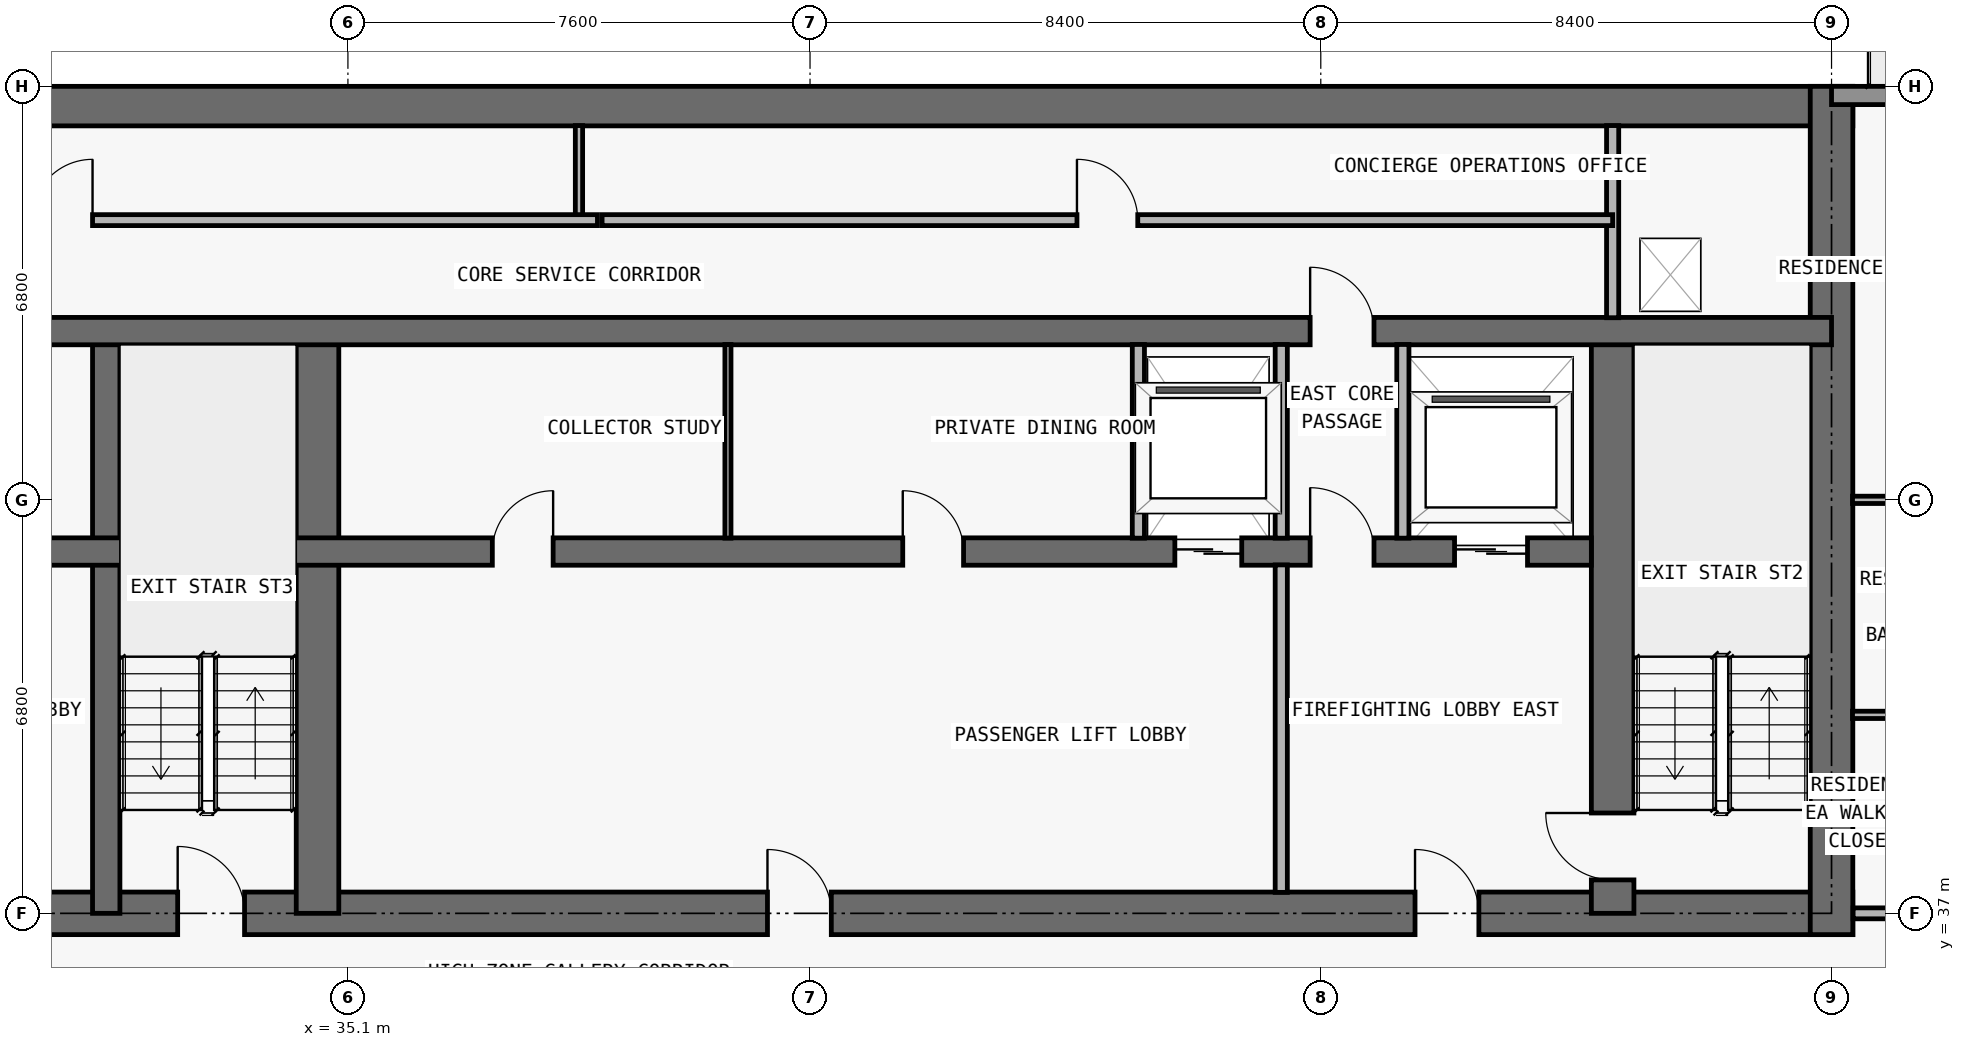
"""IFC4 building model, lengths in metres.
Left out: names, types, materials, properties, quantities, classifications, styles, units other than length and angle.
Written with IfcOpenShell. Run it as: python <this file> out.ifc"""

import sys

from ifc_helpers import new_model, si_unit, direction, frame, frame_2d, origin, place, context, subcontext, project, spatial, rectangle, extrude, element, fill, save


model = new_model("IFC4")
c1 = context("Model", 3, precision=1e-05, world=origin(), true_north=direction((0.0, 1.0)))
c2 = subcontext(c1, "Body", "Model", "MODEL_VIEW")
j1 = project(units=[si_unit("LENGTHUNIT", "METRE"), si_unit("PLANEANGLEUNIT", "RADIAN")], contexts=[c1])
p1 = place(None, origin())
s1 = spatial("IfcSite", under=j1, at=p1, CompositionType="ELEMENT")
p2 = place(p1, origin())
s2 = spatial("IfcBuilding", under=s1, at=p2, CompositionType="ELEMENT")
p3 = place(p2, frame((0.0, 0.0, 218.1)))
s3 = spatial("IfcBuildingStorey", under=s2, at=p3, CompositionType="ELEMENT", Elevation=218.1)
p4 = place(p3, frame((17.95, 37.0, 0.0), z_axis=(0.0, 0.0, 1.0), x_axis=(1.0, 0.0, 0.0)))
e1 = element("IfcWall", 1, at=p4, inside=s3, PredefinedType="SHEAR", context=c2, shape_type="SweptSolid", body=[
    extrude(rectangle(XDim=41.9, YDim=0.7, at=frame_2d((20.95, 0.0))), origin(), (0.0, 0.0, 1.0), 3.0),
])
p5 = place(p4, frame((14.35, 0.0, 0.0)))
e2 = element("IfcOpeningElement", 2, at=p5, cuts=e1, PredefinedType="OPENING", context=c2, shape_type="SweptSolid", body=[
    extrude(rectangle(XDim=1.1, YDim=2.15, at=frame_2d((0.55, 1.075))), frame((0.0, 0.36, 0.0), z_axis=(0.0, -1.0, 0.0), x_axis=(1.0, 0.0, 0.0)), (0.0, 0.0, 1.0), 0.72),
])
p6 = place(p4, frame((6.2, 0.0, 0.0)))
e3 = element("IfcOpeningElement", 3, at=p6, cuts=e1, PredefinedType="OPENING", context=c2, shape_type="SweptSolid", body=[
    extrude(rectangle(XDim=1.05, YDim=2.15, at=frame_2d((0.525, 1.075))), frame((0.0, 0.36, 0.0), z_axis=(0.0, -1.0, 0.0), x_axis=(1.0, 0.0, 0.0)), (0.0, 0.0, 1.0), 0.72),
])
p7 = place(p4, frame((34.7, 0.0, 0.0)))
e4 = element("IfcOpeningElement", 4, at=p7, cuts=e1, PredefinedType="OPENING", context=c2, shape_type="SweptSolid", body=[
    extrude(rectangle(XDim=1.05, YDim=2.15, at=frame_2d((0.525, 1.075))), frame((0.0, 0.36, 0.0), z_axis=(0.0, -1.0, 0.0), x_axis=(1.0, 0.0, 0.0)), (0.0, 0.0, 1.0), 0.72),
])
p8 = place(p4, frame((10.812, 0.0, 0.0)))
e5 = element("IfcOpeningElement", 5, at=p8, cuts=e1, PredefinedType="OPENING", context=c2, shape_type="SweptSolid", body=[
    extrude(rectangle(XDim=1.05, YDim=2.15, at=frame_2d((0.525, 1.075))), frame((0.0, 0.36, 0.0), z_axis=(0.0, -1.0, 0.0), x_axis=(1.0, 0.0, 0.0)), (0.0, 0.0, 1.0), 0.72),
])
p9 = place(p4, frame((24.05, 0.0, 0.0)))
e6 = element("IfcOpeningElement", 6, at=p9, cuts=e1, PredefinedType="OPENING", context=c2, shape_type="SweptSolid", body=[
    extrude(rectangle(XDim=1.05, YDim=2.15, at=frame_2d((0.525, 1.075))), frame((0.0, 0.36, 0.0), z_axis=(0.0, -1.0, 0.0), x_axis=(1.0, 0.0, 0.0)), (0.0, 0.0, 1.0), 0.72),
])
p10 = place(p3, frame((17.95, 50.275, 0.0), z_axis=(0.0, 0.0, 1.0), x_axis=(1.0, 0.0, 0.0)))
e7 = element("IfcWall", 7, at=p10, inside=s3, PredefinedType="SHEAR", context=c2, shape_type="SweptSolid", body=[
    extrude(rectangle(XDim=41.9, YDim=0.65, at=frame_2d((20.95, 0.0))), origin(), (0.0, 0.0, 1.0), 3.0),
])
p11 = place(p3, frame((59.5, 36.65, 0.0), z_axis=(0.0, 0.0, 1.0), x_axis=(0.0, 1.0, 0.0)))
e8 = element("IfcWall", 8, at=p11, inside=s3, PredefinedType="SHEAR", context=c2, shape_type="SweptSolid", body=[
    extrude(rectangle(XDim=13.95, YDim=0.7, at=frame_2d((6.975, 0.0))), origin(), (0.0, 0.0, 1.0), 3.0),
])
p12 = place(p3, frame((55.9, 37.0, 0.0), z_axis=(0.0, 0.0, 1.0), x_axis=(0.0, 1.0, 0.0)))
e9 = element("IfcWall", 9, at=p12, inside=s3, PredefinedType="SHEAR", context=c2, shape_type="SweptSolid", body=[
    extrude(rectangle(XDim=9.575, YDim=0.7, at=frame_2d((4.788, 0.0))), origin(), (0.0, 0.0, 1.0), 3.0),
])
p13 = place(p12, frame((0.55, 0.0, 0.0)))
e10 = element("IfcOpeningElement", 10, at=p13, cuts=e9, PredefinedType="OPENING", context=c2, shape_type="SweptSolid", body=[
    extrude(rectangle(XDim=1.1, YDim=2.15, at=frame_2d((0.55, 1.075))), frame((0.0, 0.36, 0.0), z_axis=(0.0, -1.0, 0.0), x_axis=(1.0, 0.0, 0.0)), (0.0, 0.0, 1.0), 0.72),
])
p14 = place(p3, frame((31.125, 37.0, 0.0), z_axis=(0.0, 0.0, 1.0), x_axis=(0.0, 1.0, 0.0)))
e11 = element("IfcWall", 11, at=p14, inside=s3, PredefinedType="SHEAR", context=c2, shape_type="SweptSolid", body=[
    extrude(rectangle(XDim=9.575, YDim=0.45, at=frame_2d((4.788, 0.0))), origin(), (0.0, 0.0, 1.0), 3.0),
])
p15 = place(p3, frame((34.6, 37.0, 0.0), z_axis=(0.0, 0.0, 1.0), x_axis=(0.0, 1.0, 0.0)))
e12 = element("IfcWall", 12, at=p15, inside=s3, PredefinedType="SHEAR", context=c2, shape_type="SweptSolid", body=[
    extrude(rectangle(XDim=9.575, YDim=0.7, at=frame_2d((4.788, 0.0))), origin(), (0.0, 0.0, 1.0), 3.0),
])
p16 = place(p3, frame((22.25, 42.95, 0.0), z_axis=(0.0, 0.0, 1.0), x_axis=(1.0, 0.0, 0.0)))
e13 = element("IfcWall", 13, at=p16, inside=s3, PredefinedType="SHEAR", context=c2, shape_type="SweptSolid", body=[
    extrude(rectangle(XDim=33.3, YDim=0.45, at=frame_2d((16.65, 0.0))), origin(), (0.0, 0.0, 1.0), 3.0),
])
p17 = place(p16, frame((1.05, 0.0, 0.0)))
e14 = element("IfcOpeningElement", 14, at=p17, cuts=e13, PredefinedType="OPENING", context=c2, shape_type="SweptSolid", body=[
    extrude(rectangle(XDim=1.2, YDim=2.2, at=frame_2d((0.6, 1.1))), frame((0.0, 0.235, 0.0), z_axis=(0.0, -1.0, 0.0), x_axis=(1.0, 0.0, 0.0)), (0.0, 0.0, 1.0), 0.47),
])
p18 = place(p16, frame((31.05, 0.0, 0.0)))
e15 = element("IfcOpeningElement", 15, at=p18, cuts=e13, PredefinedType="OPENING", context=c2, shape_type="SweptSolid", body=[
    extrude(rectangle(XDim=1.2, YDim=2.2, at=frame_2d((0.6, 1.1))), frame((0.0, 0.235, 0.0), z_axis=(0.0, -1.0, 0.0), x_axis=(1.0, 0.0, 0.0)), (0.0, 0.0, 1.0), 0.47),
])
p19 = place(p16, frame((26.45, 0.0, 0.0)))
e16 = element("IfcOpeningElement", 16, at=p19, cuts=e13, PredefinedType="OPENING", context=c2, shape_type="SweptSolid", body=[
    extrude(rectangle(XDim=1.1, YDim=2.2, at=frame_2d((0.55, 1.1))), frame((0.0, 0.235, 0.0), z_axis=(0.0, -1.0, 0.0), x_axis=(1.0, 0.0, 0.0)), (0.0, 0.0, 1.0), 0.47),
])
p20 = place(p16, frame((5.95, 0.0, 0.0)))
e17 = element("IfcOpeningElement", 17, at=p20, cuts=e13, PredefinedType="OPENING", context=c2, shape_type="SweptSolid", body=[
    extrude(rectangle(XDim=1.1, YDim=2.2, at=frame_2d((0.55, 1.1))), frame((0.0, 0.235, 0.0), z_axis=(0.0, -1.0, 0.0), x_axis=(1.0, 0.0, 0.0)), (0.0, 0.0, 1.0), 0.47),
])
p21 = place(p16, frame((3.625, 0.0, 0.0)))
e18 = element("IfcOpeningElement", 18, at=p21, cuts=e13, PredefinedType="OPENING", context=c2, shape_type="SweptSolid", body=[
    extrude(rectangle(XDim=1.05, YDim=2.15, at=frame_2d((0.525, 1.075))), frame((0.0, 0.235, 0.0), z_axis=(0.0, -1.0, 0.0), x_axis=(1.0, 0.0, 0.0)), (0.0, 0.0, 1.0), 0.47),
])
p22 = place(p16, frame((28.675, 0.0, 0.0)))
e19 = element("IfcOpeningElement", 19, at=p22, cuts=e13, PredefinedType="OPENING", context=c2, shape_type="SweptSolid", body=[
    extrude(rectangle(XDim=1.05, YDim=2.15, at=frame_2d((0.525, 1.075))), frame((0.0, 0.235, 0.0), z_axis=(0.0, -1.0, 0.0), x_axis=(1.0, 0.0, 0.0)), (0.0, 0.0, 1.0), 0.47),
])
p23 = place(p16, frame((15.225, 0.0, 0.0)))
e20 = element("IfcOpeningElement", 20, at=p23, cuts=e13, PredefinedType="OPENING", context=c2, shape_type="SweptSolid", body=[
    extrude(rectangle(XDim=1.0, YDim=2.2, at=frame_2d((0.5, 1.1))), frame((0.0, 0.235, 0.0), z_axis=(0.0, -1.0, 0.0), x_axis=(1.0, 0.0, 0.0)), (0.0, 0.0, 1.0), 0.47),
])
p24 = place(p16, frame((21.975, 0.0, 0.0)))
e21 = element("IfcOpeningElement", 21, at=p24, cuts=e13, PredefinedType="OPENING", context=c2, shape_type="SweptSolid", body=[
    extrude(rectangle(XDim=1.0, YDim=2.2, at=frame_2d((0.5, 1.1))), frame((0.0, 0.235, 0.0), z_axis=(0.0, -1.0, 0.0), x_axis=(1.0, 0.0, 0.0)), (0.0, 0.0, 1.0), 0.47),
])
p25 = place(p3, frame((18.3, 46.575, 0.0), z_axis=(0.0, 0.0, 1.0), x_axis=(1.0, 0.0, 0.0)))
e22 = element("IfcWall", 22, at=p25, inside=s3, PredefinedType="SHEAR", context=c2, shape_type="SweptSolid", body=[
    extrude(rectangle(XDim=41.2, YDim=0.45, at=frame_2d((20.6, 0.0))), origin(), (0.0, 0.0, 1.0), 3.0),
])
p26 = place(p25, frame((7.575, 0.0, 0.0)))
e23 = element("IfcOpeningElement", 23, at=p26, cuts=e22, PredefinedType="OPENING", context=c2, shape_type="SweptSolid", body=[
    extrude(rectangle(XDim=1.05, YDim=2.15, at=frame_2d((0.525, 1.075))), frame((0.0, 0.235, 0.0), z_axis=(0.0, -1.0, 0.0), x_axis=(1.0, 0.0, 0.0)), (0.0, 0.0, 1.0), 0.47),
])
p27 = place(p25, frame((32.625, 0.0, 0.0)))
e24 = element("IfcOpeningElement", 24, at=p27, cuts=e22, PredefinedType="OPENING", context=c2, shape_type="SweptSolid", body=[
    extrude(rectangle(XDim=1.05, YDim=2.15, at=frame_2d((0.525, 1.075))), frame((0.0, 0.235, 0.0), z_axis=(0.0, -1.0, 0.0), x_axis=(1.0, 0.0, 0.0)), (0.0, 0.0, 1.0), 0.47),
])
p28 = place(p3, frame((59.5, 50.45, 0.0), z_axis=(0.0, 0.0, 1.0), x_axis=(1.0, 0.0, 0.0)))
e25 = element("IfcWall", 25, at=p28, inside=s3, PredefinedType="STANDARD", context=c2, shape_type="SweptSolid", body=[
    extrude(rectangle(XDim=8.2, YDim=0.3, at=frame_2d((4.1, 0.0))), origin(), (0.0, 0.0, 1.0), 3.0),
])
p29 = place(p28, frame((3.1, 0.0, 0.0)))
e26 = element("IfcOpeningElement", 26, at=p29, cuts=e25, PredefinedType="OPENING", context=c2, shape_type="SweptSolid", body=[
    extrude(rectangle(XDim=2.0, YDim=2.3, at=frame_2d((1.0, 1.15))), frame((0.0, 0.16, 0.0), z_axis=(0.0, -1.0, 0.0), x_axis=(1.0, 0.0, 0.0)), (0.0, 0.0, 1.0), 0.32),
])
p30 = place(p3, frame((38.9, 48.4, 0.0), z_axis=(0.0, 0.0, 1.0), x_axis=(0.0, 1.0, 0.0)))
e27 = element("IfcWall", 27, at=p30, inside=s3, PredefinedType="PARTITIONING", context=c2, shape_type="SweptSolid", body=[
    extrude(rectangle(XDim=1.555, YDim=0.12, at=frame_2d((0.778, 0.0))), origin(), (0.0, 0.0, 1.0), 3.0),
])
p31 = place(p3, frame((41.35, 43.17, 0.0), z_axis=(0.0, 0.0, 1.0), x_axis=(0.0, 1.0, 0.0)))
e28 = element("IfcWall", 28, at=p31, inside=s3, PredefinedType="MOVABLE", context=c2, shape_type="SweptSolid", body=[
    extrude(rectangle(XDim=3.185, YDim=0.1, at=frame_2d((1.593, 0.0))), origin(), (0.0, 0.0, 1.0), 3.0),
])
p32 = place(p3, frame((48.1, 43.17, 0.0), z_axis=(0.0, 0.0, 1.0), x_axis=(0.0, 1.0, 0.0)))
e29 = element("IfcWall", 29, at=p32, inside=s3, PredefinedType="PARTITIONING", context=c2, shape_type="SweptSolid", body=[
    extrude(rectangle(XDim=3.185, YDim=0.2, at=frame_2d((1.593, 0.0))), origin(), (0.0, 0.0, 1.0), 3.0),
])
p33 = place(p3, frame((50.45, 37.345, 0.0), z_axis=(0.0, 0.0, 1.0), x_axis=(0.0, 1.0, 0.0)))
e30 = element("IfcWall", 30, at=p33, inside=s3, PredefinedType="PARTITIONING", context=c2, shape_type="SweptSolid", body=[
    extrude(rectangle(XDim=5.385, YDim=0.2, at=frame_2d((2.692, 0.0))), origin(), (0.0, 0.0, 1.0), 3.0),
])
for number, where, z_axis, x_axis in (
    (31, (50.45, 43.17, 0.0), (0.0, 0.0, 1.0), (0.0, 1.0, 0.0)),
    (32, (52.45, 43.17, 0.0), (0.0, 0.0, 1.0), (0.0, 1.0, 0.0)),
):
    element("IfcWall", number, at=place(p3, frame(where, z_axis=z_axis, x_axis=x_axis)), inside=s3, PredefinedType="PARTITIONING", context=c2, shape_type="SweptSolid", body=[
        extrude(rectangle(XDim=3.185, YDim=0.2, at=frame_2d((1.593, 0.0))), origin(), (0.0, 0.0, 1.0), 3.0),
    ])
p34 = place(p3, frame((55.9, 46.795, 0.0), z_axis=(0.0, 0.0, 1.0), x_axis=(0.0, 1.0, 0.0)))
e33 = element("IfcWall", 33, at=p34, inside=s3, PredefinedType="PARTITIONING", context=c2, shape_type="SweptSolid", body=[
    extrude(rectangle(XDim=3.16, YDim=0.2, at=frame_2d((1.58, 0.0))), origin(), (0.0, 0.0, 1.0), 3.0),
])
p35 = place(p3, frame((59.855, 37.0, 0.0), z_axis=(0.0, 0.0, 1.0), x_axis=(1.0, 0.0, 0.0)))
e34 = element("IfcWall", 34, at=p35, inside=s3, PredefinedType="PARTITIONING", context=c2, shape_type="SweptSolid", body=[
    extrude(rectangle(XDim=7.845, YDim=0.18, at=frame_2d((3.922, 0.0))), origin(), (0.0, 0.0, 1.0), 3.0),
])
p36 = place(p35, frame((3.349, 0.0, 0.0)))
e35 = element("IfcOpeningElement", 35, at=p36, cuts=e34, PredefinedType="OPENING", context=c2, shape_type="SweptSolid", body=[
    extrude(rectangle(XDim=1.0, YDim=2.2, at=frame_2d((0.5, 1.1))), frame((0.0, 0.1, 0.0), z_axis=(0.0, -1.0, 0.0), x_axis=(1.0, 0.0, 0.0)), (0.0, 0.0, 1.0), 0.2),
])
p37 = place(p3, frame((59.845, 40.264, 0.0), z_axis=(0.0, 0.0, 1.0), x_axis=(1.0, 0.0, 0.0)))
e36 = element("IfcWall", 36, at=p37, inside=s3, PredefinedType="PARTITIONING", context=c2, shape_type="SweptSolid", body=[
    extrude(rectangle(XDim=2.305, YDim=0.12, at=frame_2d((1.152, 0.0))), origin(), (0.0, 0.0, 1.0), 3.0),
])
p38 = place(p3, frame((59.845, 43.8, 0.0), z_axis=(0.0, 0.0, 1.0), x_axis=(1.0, 0.0, 0.0)))
e37 = element("IfcWall", 37, at=p38, inside=s3, PredefinedType="PARTITIONING", context=c2, shape_type="SweptSolid", body=[
    extrude(rectangle(XDim=11.56, YDim=0.12, at=frame_2d((5.78, 0.0))), origin(), (0.0, 0.0, 1.0), 2.368),
])
p39 = place(p38, frame((3.409, 0.0, 0.0)))
e38 = element("IfcOpeningElement", 38, at=p39, cuts=e37, PredefinedType="OPENING", context=c2, shape_type="SweptSolid", body=[
    extrude(rectangle(XDim=0.9, YDim=2.15, at=frame_2d((0.45, 1.075))), frame((0.0, 0.07, 0.0), z_axis=(0.0, -1.0, 0.0), x_axis=(1.0, 0.0, 0.0)), (0.0, 0.0, 1.0), 0.14),
])
p40 = place(p38, frame((0.728, 0.0, 0.0)))
e39 = element("IfcOpeningElement", 39, at=p40, cuts=e37, PredefinedType="OPENING", context=c2, shape_type="SweptSolid", body=[
    extrude(rectangle(XDim=0.85, YDim=2.1, at=frame_2d((0.425, 1.05))), frame((0.0, 0.07, 0.0), z_axis=(0.0, -1.0, 0.0), x_axis=(1.0, 0.0, 0.0)), (0.0, 0.0, 1.0), 0.14),
])
p41 = place(p3, frame((21.9, 48.4, 0.0), z_axis=(0.0, 0.0, 1.0), x_axis=(1.0, 0.0, 0.0)))
e40 = element("IfcWall", 40, at=p41, inside=s3, PredefinedType="PARTITIONING", context=c2, shape_type="SweptSolid", body=[
    extrude(rectangle(XDim=17.304, YDim=0.18, at=frame_2d((8.652, 0.0))), origin(), (0.0, 0.0, 1.0), 3.0),
])
p42 = place(p41, frame((8.0, 0.0, 0.0)))
e41 = element("IfcOpeningElement", 41, at=p42, cuts=e40, PredefinedType="OPENING", context=c2, shape_type="SweptSolid", body=[
    extrude(rectangle(XDim=1.0, YDim=2.2, at=frame_2d((0.5, 1.1))), frame((0.0, 0.1, 0.0), z_axis=(0.0, -1.0, 0.0), x_axis=(1.0, 0.0, 0.0)), (0.0, 0.0, 1.0), 0.2),
])
p43 = place(p3, frame((39.28, 48.4, 0.0), z_axis=(0.0, 0.0, 1.0), x_axis=(1.0, 0.0, 0.0)))
e42 = element("IfcWall", 42, at=p43, inside=s3, PredefinedType="PARTITIONING", context=c2, shape_type="SweptSolid", body=[
    extrude(rectangle(XDim=16.62, YDim=0.18, at=frame_2d((8.31, 0.0))), origin(), (0.0, 0.0, 1.0), 3.0),
])
p44 = place(p43, frame((7.81, 0.0, 0.0)))
e43 = element("IfcOpeningElement", 43, at=p44, cuts=e42, PredefinedType="OPENING", context=c2, shape_type="SweptSolid", body=[
    extrude(rectangle(XDim=1.0, YDim=2.2, at=frame_2d((0.5, 1.1))), frame((0.0, 0.1, 0.0), z_axis=(0.0, -1.0, 0.0), x_axis=(1.0, 0.0, 0.0)), (0.0, 0.0, 1.0), 0.2),
])
p45 = place(p18, origin())
e44 = element("IfcDoor", 44, at=p45, inside=s3, OperationType="DOUBLE_DOOR_SLIDING", PredefinedType="DOOR", context=c2, shape_type="SweptSolid", body=[
    extrude(rectangle(XDim=1.2, YDim=2.2, at=frame_2d((0.6, 1.1))), frame((0.0, 0.025, 0.0), z_axis=(0.0, -1.0, 0.0), x_axis=(1.0, 0.0, 0.0)), (0.0, 0.0, 1.0), 0.05),
])
fill(e15, e44)
p46 = place(p19, origin())
e45 = element("IfcDoor", 45, at=p46, inside=s3, OperationType="DOUBLE_DOOR_SLIDING", PredefinedType="DOOR", context=c2, shape_type="SweptSolid", body=[
    extrude(rectangle(XDim=1.1, YDim=2.2, at=frame_2d((0.55, 1.1))), frame((0.0, 0.025, 0.0), z_axis=(0.0, -1.0, 0.0), x_axis=(1.0, 0.0, 0.0)), (0.0, 0.0, 1.0), 0.05),
])
fill(e16, e45)
p47 = place(p5, origin())
e46 = element("IfcDoor", 46, at=p47, inside=s3, OperationType="SINGLE_SWING_LEFT", PredefinedType="DOOR", context=c2, shape_type="SweptSolid", body=[
    extrude(rectangle(XDim=1.1, YDim=2.15, at=frame_2d((0.55, 1.075))), frame((0.0, 0.025, 0.0), z_axis=(0.0, -1.0, 0.0), x_axis=(1.0, 0.0, 0.0)), (0.0, 0.0, 1.0), 0.05),
])
fill(e2, e46)
p48 = place(p7, origin())
e47 = element("IfcDoor", 47, at=p48, inside=s3, OperationType="SINGLE_SWING_LEFT", PredefinedType="DOOR", context=c2, shape_type="SweptSolid", body=[
    extrude(rectangle(XDim=1.05, YDim=2.15, at=frame_2d((0.525, 1.075))), frame((0.0, 0.025, 0.0), z_axis=(0.0, -1.0, 0.0), x_axis=(1.0, 0.0, 0.0)), (0.0, 0.0, 1.0), 0.05),
])
fill(e4, e47)
p49 = place(p13, origin())
e48 = element("IfcDoor", 48, at=p49, inside=s3, OperationType="SINGLE_SWING_RIGHT", PredefinedType="DOOR", context=c2, shape_type="SweptSolid", body=[
    extrude(rectangle(XDim=1.1, YDim=2.15, at=frame_2d((0.55, 1.075))), frame((0.0, 0.025, 0.0), z_axis=(0.0, -1.0, 0.0), x_axis=(1.0, 0.0, 0.0)), (0.0, 0.0, 1.0), 0.05),
])
fill(e10, e48)
p50 = place(p22, origin())
e49 = element("IfcDoor", 49, at=p50, inside=s3, OperationType="SINGLE_SWING_LEFT", PredefinedType="DOOR", context=c2, shape_type="SweptSolid", body=[
    extrude(rectangle(XDim=1.05, YDim=2.15, at=frame_2d((0.525, 1.075))), frame((0.0, 0.025, 0.0), z_axis=(0.0, -1.0, 0.0), x_axis=(1.0, 0.0, 0.0)), (0.0, 0.0, 1.0), 0.05),
])
fill(e19, e49)
p51 = place(p9, origin())
e50 = element("IfcDoor", 50, at=p51, inside=s3, OperationType="SINGLE_SWING_LEFT", PredefinedType="DOOR", context=c2, shape_type="SweptSolid", body=[
    extrude(rectangle(XDim=1.05, YDim=2.15, at=frame_2d((0.525, 1.075))), frame((0.0, 0.025, 0.0), z_axis=(0.0, -1.0, 0.0), x_axis=(1.0, 0.0, 0.0)), (0.0, 0.0, 1.0), 0.05),
])
fill(e6, e50)
p52 = place(p23, origin())
e51 = element("IfcDoor", 51, at=p52, inside=s3, OperationType="SINGLE_SWING_RIGHT", PredefinedType="DOOR", context=c2, shape_type="SweptSolid", body=[
    extrude(rectangle(XDim=1.0, YDim=2.2, at=frame_2d((0.5, 1.1))), frame((0.0, 0.025, 0.0), z_axis=(0.0, -1.0, 0.0), x_axis=(1.0, 0.0, 0.0)), (0.0, 0.0, 1.0), 0.05),
])
fill(e20, e51)
p53 = place(p24, origin())
e52 = element("IfcDoor", 52, at=p53, inside=s3, OperationType="SINGLE_SWING_LEFT", PredefinedType="DOOR", context=c2, shape_type="SweptSolid", body=[
    extrude(rectangle(XDim=1.0, YDim=2.2, at=frame_2d((0.5, 1.1))), frame((0.0, 0.025, 0.0), z_axis=(0.0, -1.0, 0.0), x_axis=(1.0, 0.0, 0.0)), (0.0, 0.0, 1.0), 0.05),
])
fill(e21, e52)
p54 = place(p27, origin())
e53 = element("IfcDoor", 53, at=p54, inside=s3, OperationType="SINGLE_SWING_LEFT", PredefinedType="DOOR", context=c2, shape_type="SweptSolid", body=[
    extrude(rectangle(XDim=1.05, YDim=2.15, at=frame_2d((0.525, 1.075))), frame((0.0, 0.025, 0.0), z_axis=(0.0, -1.0, 0.0), x_axis=(1.0, 0.0, 0.0)), (0.0, 0.0, 1.0), 0.05),
])
fill(e24, e53)
p55 = place(p42, origin())
e54 = element("IfcDoor", 54, at=p55, inside=s3, OperationType="SINGLE_SWING_RIGHT", PredefinedType="DOOR", context=c2, shape_type="SweptSolid", body=[
    extrude(rectangle(XDim=1.0, YDim=2.2, at=frame_2d((0.5, 1.1))), frame((0.0, 0.025, 0.0), z_axis=(0.0, -1.0, 0.0), x_axis=(1.0, 0.0, 0.0)), (0.0, 0.0, 1.0), 0.05),
])
fill(e41, e54)
p56 = place(p44, origin())
e55 = element("IfcDoor", 55, at=p56, inside=s3, OperationType="SINGLE_SWING_LEFT", PredefinedType="DOOR", context=c2, shape_type="SweptSolid", body=[
    extrude(rectangle(XDim=1.0, YDim=2.2, at=frame_2d((0.5, 1.1))), frame((0.0, 0.025, 0.0), z_axis=(0.0, -1.0, 0.0), x_axis=(1.0, 0.0, 0.0)), (0.0, 0.0, 1.0), 0.05),
])
fill(e43, e55)
save(model, sys.argv[1])
